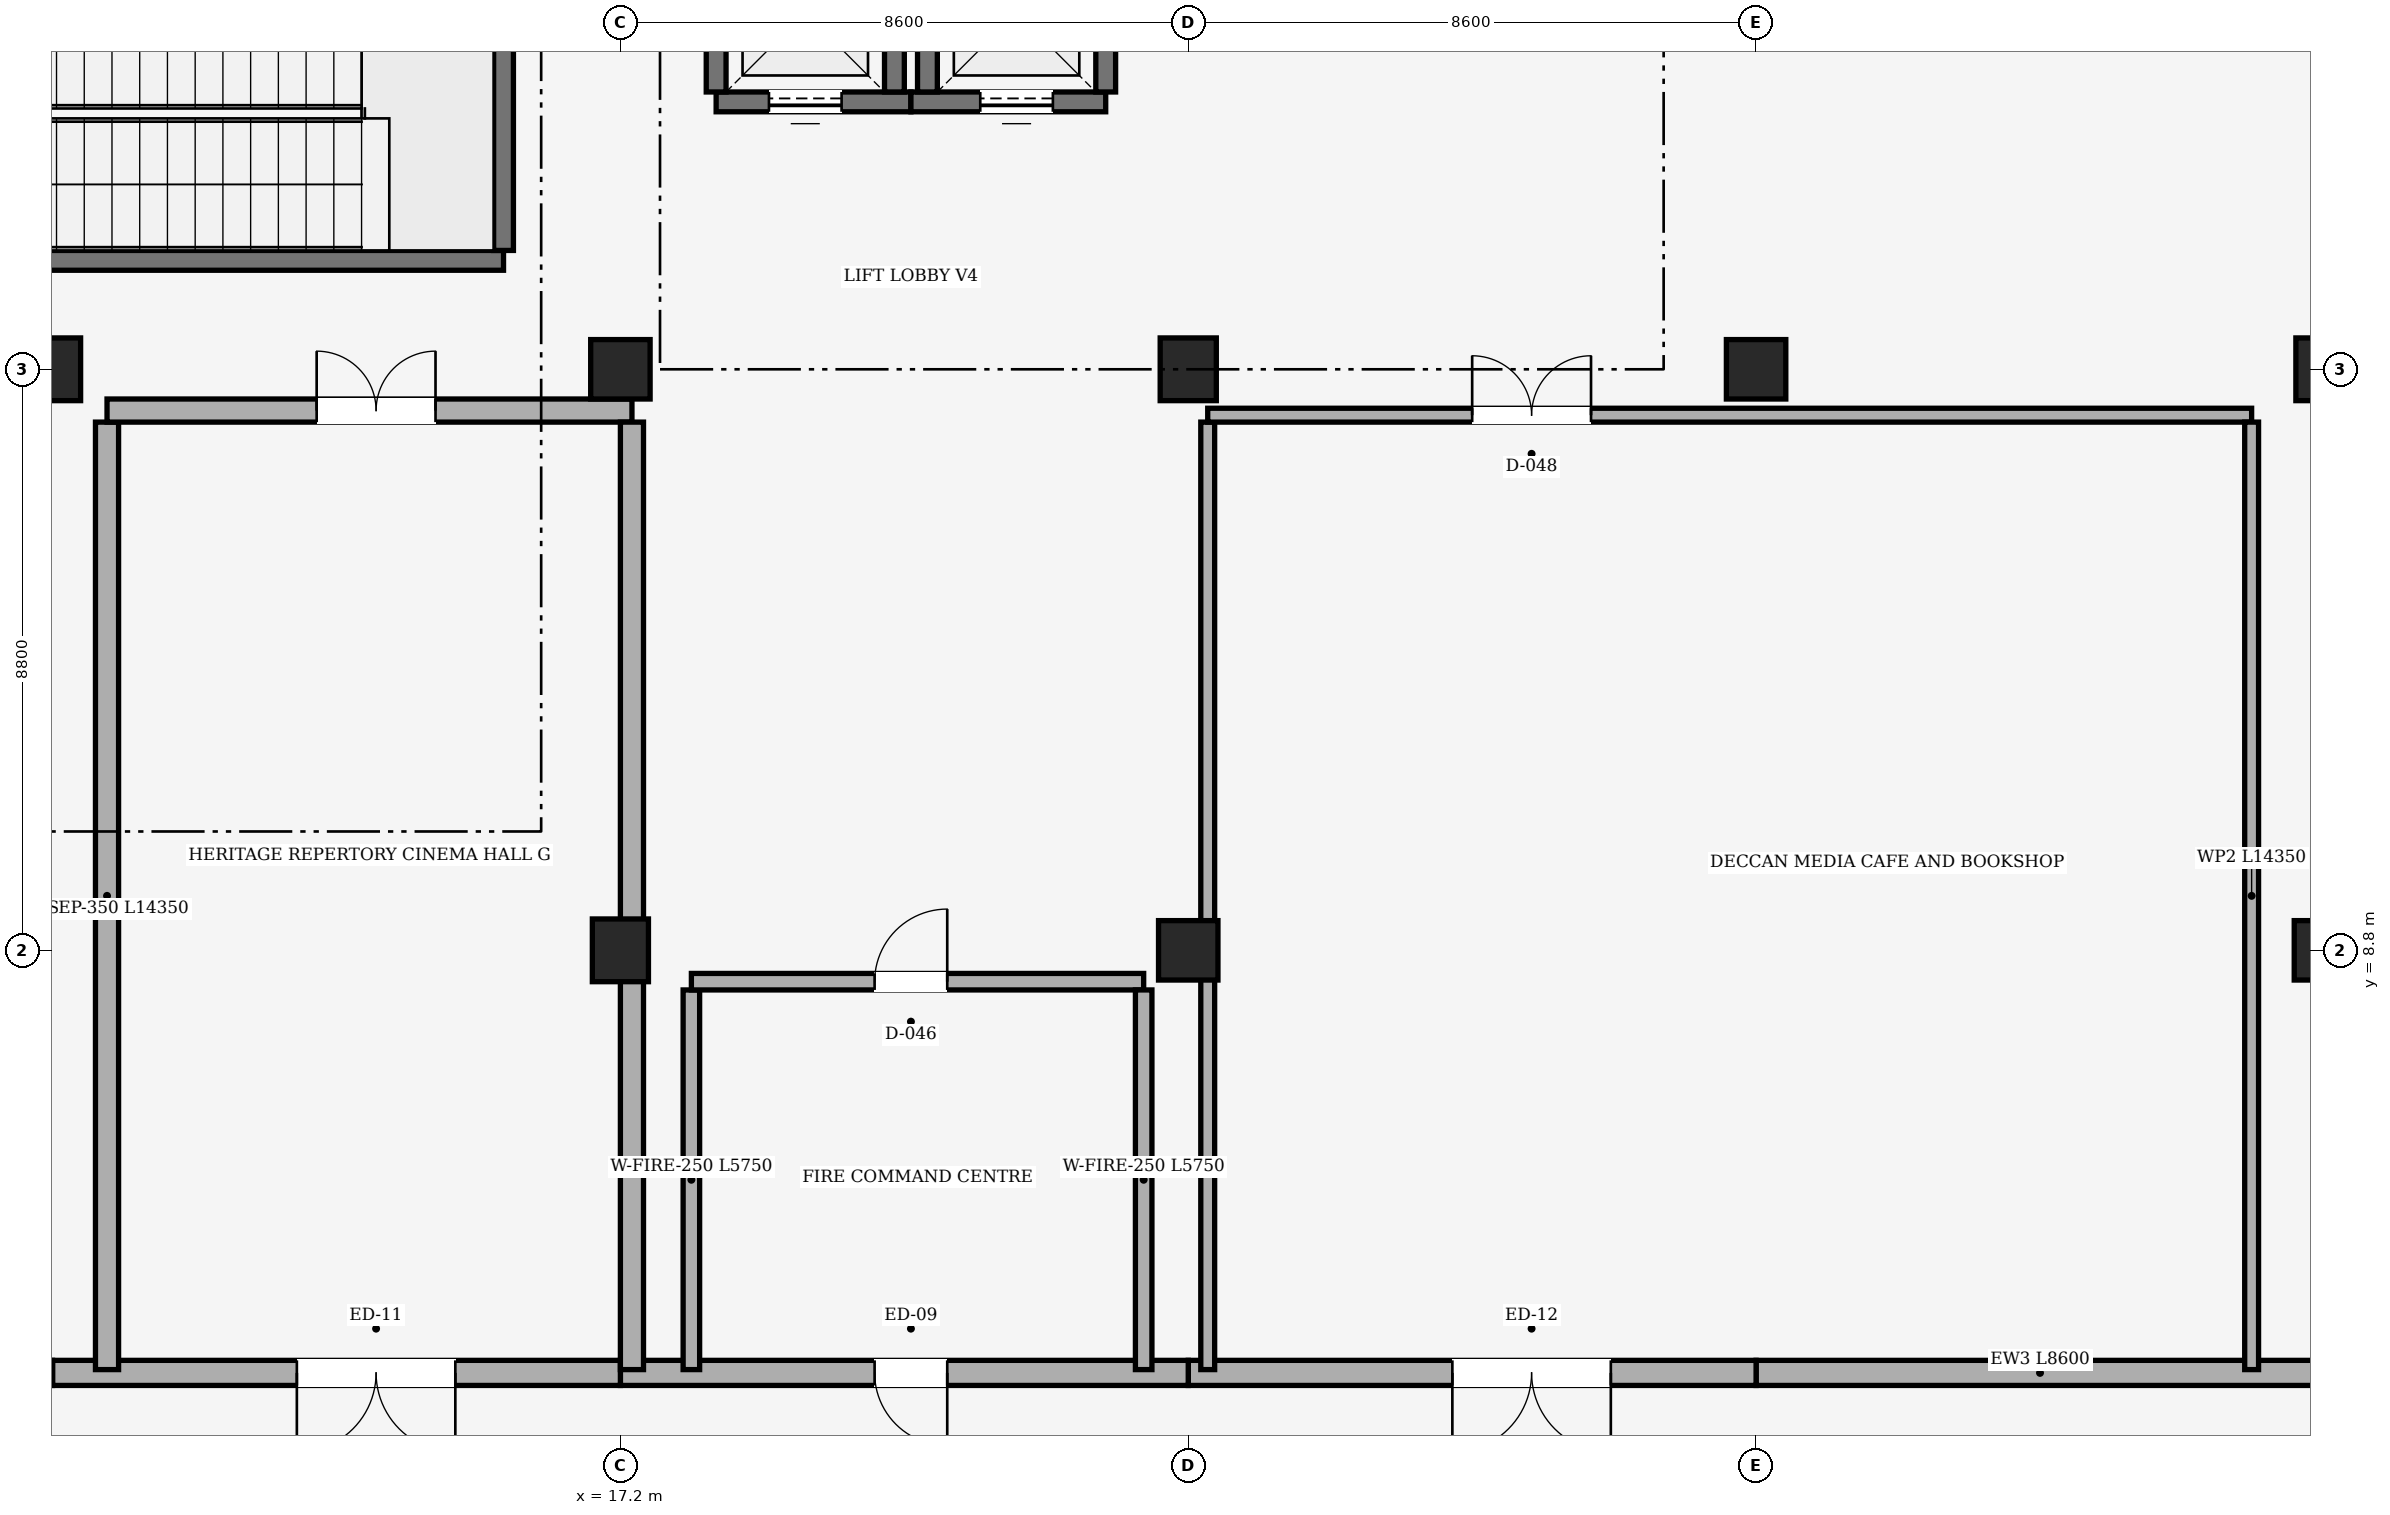
"""IFC4 building model, lengths in metres.
Left out: names, types, materials, properties, quantities, classifications, styles, units other than length and angle.
Written with IfcOpenShell. Run it as: python <this file> out.ifc"""

import sys

from ifc_helpers import new_model, si_unit, direction, frame, frame_2d, origin, origin_2d, place, context, subcontext, project, spatial, rectangle, extrude, element, fill, save


model = new_model("IFC4")
c1 = context("Model", 3, precision=1e-05, world=origin(), true_north=direction((0.0, 1.0)))
c2 = subcontext(c1, "Body", "Model", "MODEL_VIEW")
j1 = project(units=[si_unit("LENGTHUNIT", "METRE"), si_unit("PLANEANGLEUNIT", "RADIAN")], contexts=[c1])
p1 = place(None, origin())
s1 = spatial("IfcSite", under=j1, at=p1, CompositionType="ELEMENT")
p2 = place(p1, origin())
s2 = spatial("IfcBuilding", under=s1, at=p2, CompositionType="ELEMENT")
p3 = place(p2, origin())
s3 = spatial("IfcBuildingStorey", under=s2, at=p3, CompositionType="ELEMENT", Elevation=0.0)
for number, where, z_axis, x_axis in (
    (1, (8.6, 17.6, 0.0), (0.0, 0.0, 1.0), (1.0, 0.0, 0.0)),
    (2, (17.2, 8.8, 0.0), (0.0, 0.0, 1.0), (1.0, 0.0, 0.0)),
):
    element("IfcColumn", number, at=place(p3, frame(where, z_axis=z_axis, x_axis=x_axis)), inside=s3, PredefinedType="COLUMN", context=c2, shape_type="SweptSolid", body=[
        extrude(rectangle(XDim=0.85, YDim=0.95, at=origin_2d()), origin(), (0.0, 0.0, 1.0), 4.25),
    ])
for number, where, z_axis, x_axis in (
    (3, (17.2, 17.6, 0.0), (0.0, 0.0, 1.0), (1.0, 0.0, 0.0)),
    (4, (25.8, 8.8, 0.0), (0.0, 0.0, 1.0), (1.0, 0.0, 0.0)),
):
    element("IfcColumn", number, at=place(p3, frame(where, z_axis=z_axis, x_axis=x_axis)), inside=s3, PredefinedType="COLUMN", context=c2, shape_type="SweptSolid", body=[
        extrude(rectangle(XDim=0.9, YDim=0.9, at=origin_2d()), origin(), (0.0, 0.0, 1.0), 4.25),
    ])
p4 = place(p3, frame((25.8, 17.6, 0.0), z_axis=(0.0, 0.0, 1.0), x_axis=(1.0, 0.0, 0.0)))
e5 = element("IfcColumn", 5, at=p4, inside=s3, PredefinedType="COLUMN", context=c2, shape_type="SweptSolid", body=[
    extrude(rectangle(XDim=0.85, YDim=0.95, at=origin_2d()), origin(), (0.0, 0.0, 1.0), 4.25),
])
for number, where, z_axis, x_axis in (
    (6, (34.4, 17.6, 0.0), (0.0, 0.0, 1.0), (1.0, 0.0, 0.0)),
    (7, (43.0, 8.8, 0.0), (0.0, 0.0, 1.0), (1.0, 0.0, 0.0)),
):
    element("IfcColumn", number, at=place(p3, frame(where, z_axis=z_axis, x_axis=x_axis)), inside=s3, PredefinedType="COLUMN", context=c2, shape_type="SweptSolid", body=[
        extrude(rectangle(XDim=0.9, YDim=0.9, at=origin_2d()), origin(), (0.0, 0.0, 1.0), 4.25),
    ])
p5 = place(p3, frame((43.0, 17.6, 0.0), z_axis=(0.0, 0.0, 1.0), x_axis=(1.0, 0.0, 0.0)))
e8 = element("IfcColumn", 8, at=p5, inside=s3, PredefinedType="COLUMN", context=c2, shape_type="SweptSolid", body=[
    extrude(rectangle(XDim=0.85, YDim=0.95, at=origin_2d()), origin(), (0.0, 0.0, 1.0), 4.25),
])
p6 = place(p3, frame((43.0, 2.4, 0.0), z_axis=(0.0, 0.0, 1.0), x_axis=(-1.0, 0.0, 0.0)))
e9 = element("IfcWall", 9, at=p6, inside=s3, PredefinedType="SOLIDWALL", context=c2, shape_type="SweptSolid", body=[
    extrude(rectangle(XDim=8.6, YDim=0.38, at=frame_2d((4.3, 0.0))), origin(), (0.0, 0.0, 1.0), 4.235),
])
p7 = place(p3, frame((34.4, 2.4, 0.0), z_axis=(0.0, 0.0, 1.0), x_axis=(-1.0, 0.0, 0.0)))
e10 = element("IfcWall", 10, at=p7, inside=s3, PredefinedType="SOLIDWALL", context=c2, shape_type="SweptSolid", body=[
    extrude(rectangle(XDim=8.6, YDim=0.38, at=frame_2d((4.3, 0.0))), origin(), (0.0, 0.0, 1.0), 4.235),
])
p8 = place(p7, frame((2.2, 0.0, 0.0)))
e11 = element("IfcOpeningElement", 11, at=p8, cuts=e10, PredefinedType="OPENING", context=c2, shape_type="SweptSolid", body=[
    extrude(rectangle(XDim=2.4, YDim=2.3, at=frame_2d((1.2, 1.15))), frame((0.0, 0.19, 0.0), z_axis=(0.0, -1.0, 0.0), x_axis=(1.0, 0.0, 0.0)), (0.0, 0.0, 1.0), 0.38),
])
p9 = place(p3, frame((25.8, 2.4, 0.0), z_axis=(0.0, 0.0, 1.0), x_axis=(-1.0, 0.0, 0.0)))
e12 = element("IfcWall", 12, at=p9, inside=s3, PredefinedType="SOLIDWALL", context=c2, shape_type="SweptSolid", body=[
    extrude(rectangle(XDim=8.6, YDim=0.38, at=frame_2d((4.3, 0.0))), origin(), (0.0, 0.0, 1.0), 4.235),
])
p10 = place(p9, frame((3.65, 0.0, 0.0)))
e13 = element("IfcOpeningElement", 13, at=p10, cuts=e12, PredefinedType="OPENING", context=c2, shape_type="SweptSolid", body=[
    extrude(rectangle(XDim=1.1, YDim=2.15, at=frame_2d((0.55, 1.075))), frame((0.0, 0.19, 0.0), z_axis=(0.0, -1.0, 0.0), x_axis=(1.0, 0.0, 0.0)), (0.0, 0.0, 1.0), 0.38),
])
p11 = place(p3, frame((17.2, 2.4, 0.0), z_axis=(0.0, 0.0, 1.0), x_axis=(-1.0, 0.0, 0.0)))
e14 = element("IfcWall", 14, at=p11, inside=s3, PredefinedType="SOLIDWALL", context=c2, shape_type="SweptSolid", body=[
    extrude(rectangle(XDim=8.6, YDim=0.38, at=frame_2d((4.3, 0.0))), origin(), (0.0, 0.0, 1.0), 4.235),
])
p12 = place(p11, frame((2.5, 0.0, 0.0)))
e15 = element("IfcOpeningElement", 15, at=p12, cuts=e14, PredefinedType="OPENING", context=c2, shape_type="SweptSolid", body=[
    extrude(rectangle(XDim=2.4, YDim=2.3, at=frame_2d((1.2, 1.15))), frame((0.0, 0.19, 0.0), z_axis=(0.0, -1.0, 0.0), x_axis=(1.0, 0.0, 0.0)), (0.0, 0.0, 1.0), 0.38),
])
p13 = place(p3, frame((15.43, 19.25, 0.0), z_axis=(0.0, 0.0, 1.0), x_axis=(-1.0, 0.0, 0.0)))
e16 = element("IfcWall", 16, at=p13, inside=s3, PredefinedType="SHEAR", context=c2, shape_type="SweptSolid", body=[
    extrude(rectangle(XDim=10.18, YDim=0.3, at=frame_2d((5.09, 0.0))), origin(), (0.0, 0.0, 1.0), 4.25),
])
p14 = place(p3, frame((15.43, 23.55, 0.0), z_axis=(0.0, 0.0, 1.0), x_axis=(0.0, -1.0, 0.0)))
e17 = element("IfcWall", 17, at=p14, inside=s3, PredefinedType="SHEAR", context=c2, shape_type="SweptSolid", body=[
    extrude(rectangle(XDim=4.15, YDim=0.3, at=frame_2d((2.075, 0.0))), origin(), (0.0, 0.0, 1.0), 4.25),
])
p15 = place(p3, frame((21.6, 21.65, 0.0), z_axis=(0.0, 0.0, 1.0), x_axis=(-1.0, 0.0, 0.0)))
e18 = element("IfcWall", 18, at=p15, inside=s3, PredefinedType="SHEAR", context=c2, shape_type="SweptSolid", body=[
    extrude(rectangle(XDim=2.95, YDim=0.3, at=frame_2d((1.475, 0.0))), origin(), (0.0, 0.0, 1.0), 4.25),
])
p16 = place(p15, frame((1.05, 0.0, 0.0)))
e19 = element("IfcOpeningElement", 19, at=p16, cuts=e18, PredefinedType="OPENING", context=c2, shape_type="SweptSolid", body=[
    extrude(rectangle(XDim=1.1, YDim=2.1, at=frame_2d((0.55, 1.05))), frame((0.0, 0.15, 0.0), z_axis=(0.0, -1.0, 0.0), x_axis=(1.0, 0.0, 0.0)), (0.0, 0.0, 1.0), 0.3),
])
for number, where, z_axis, x_axis in (
    (20, (18.65, 21.8, 0.0), (0.0, 0.0, 1.0), (0.0, 1.0, 0.0)),
    (21, (21.35, 24.2, 0.0), (0.0, 0.0, 1.0), (0.0, -1.0, 0.0)),
):
    element("IfcWall", number, at=place(p3, frame(where, z_axis=z_axis, x_axis=x_axis)), inside=s3, PredefinedType="SHEAR", context=c2, shape_type="SweptSolid", body=[
        extrude(rectangle(XDim=2.4, YDim=0.3, at=frame_2d((1.2, 0.0))), origin(), (0.0, 0.0, 1.0), 4.25),
    ])
p17 = place(p3, frame((24.55, 21.65, 0.0), z_axis=(0.0, 0.0, 1.0), x_axis=(-1.0, 0.0, 0.0)))
e22 = element("IfcWall", 22, at=p17, inside=s3, PredefinedType="SHEAR", context=c2, shape_type="SweptSolid", body=[
    extrude(rectangle(XDim=2.95, YDim=0.3, at=frame_2d((1.475, 0.0))), origin(), (0.0, 0.0, 1.0), 4.25),
])
p18 = place(p17, frame((0.8, 0.0, 0.0)))
e23 = element("IfcOpeningElement", 23, at=p18, cuts=e22, PredefinedType="OPENING", context=c2, shape_type="SweptSolid", body=[
    extrude(rectangle(XDim=1.1, YDim=2.1, at=frame_2d((0.55, 1.05))), frame((0.0, 0.15, 0.0), z_axis=(0.0, -1.0, 0.0), x_axis=(1.0, 0.0, 0.0)), (0.0, 0.0, 1.0), 0.3),
])
for number, where, z_axis, x_axis in (
    (24, (21.85, 21.8, 0.0), (0.0, 0.0, 1.0), (0.0, 1.0, 0.0)),
    (25, (24.55, 24.2, 0.0), (0.0, 0.0, 1.0), (0.0, -1.0, 0.0)),
):
    element("IfcWall", number, at=place(p3, frame(where, z_axis=z_axis, x_axis=x_axis)), inside=s3, PredefinedType="SHEAR", context=c2, shape_type="SweptSolid", body=[
        extrude(rectangle(XDim=2.4, YDim=0.3, at=frame_2d((1.2, 0.0))), origin(), (0.0, 0.0, 1.0), 4.25),
    ])
p19 = place(p3, frame((18.275, 2.45, 0.0), z_axis=(0.0, 0.0, 1.0), x_axis=(0.0, 1.0, 0.0)))
e26 = element("IfcWall", 26, at=p19, inside=s3, PredefinedType="SOLIDWALL", context=c2, shape_type="SweptSolid", body=[
    extrude(rectangle(XDim=5.75, YDim=0.25, at=frame_2d((2.875, 0.0))), origin(), (0.0, 0.0, 1.0), 4.23),
])
p20 = place(p3, frame((18.275, 8.325, 0.0), z_axis=(0.0, 0.0, 1.0), x_axis=(1.0, 0.0, 0.0)))
e27 = element("IfcWall", 27, at=p20, inside=s3, PredefinedType="SOLIDWALL", context=c2, shape_type="SweptSolid", body=[
    extrude(rectangle(XDim=6.85, YDim=0.25, at=frame_2d((3.425, 0.0))), origin(), (0.0, 0.0, 1.0), 3.38),
])
p21 = place(p20, frame((2.775, 0.0, 0.0)))
e28 = element("IfcOpeningElement", 28, at=p21, cuts=e27, PredefinedType="OPENING", context=c2, shape_type="SweptSolid", body=[
    extrude(rectangle(XDim=1.1, YDim=2.1, at=frame_2d((0.55, 1.05))), frame((0.0, 0.125, 0.0), z_axis=(0.0, -1.0, 0.0), x_axis=(1.0, 0.0, 0.0)), (0.0, 0.0, 1.0), 0.25),
])
p22 = place(p3, frame((25.125, 8.2, 0.0), z_axis=(0.0, 0.0, 1.0), x_axis=(0.0, -1.0, 0.0)))
e29 = element("IfcWall", 29, at=p22, inside=s3, PredefinedType="SOLIDWALL", context=c2, shape_type="SweptSolid", body=[
    extrude(rectangle(XDim=5.75, YDim=0.25, at=frame_2d((2.875, 0.0))), origin(), (0.0, 0.0, 1.0), 4.23),
])
p23 = place(p3, frame((9.425, 2.45, 0.0), z_axis=(0.0, 0.0, 1.0), x_axis=(0.0, 1.0, 0.0)))
e30 = element("IfcWall", 30, at=p23, inside=s3, PredefinedType="SOLIDWALL", context=c2, shape_type="SweptSolid", body=[
    extrude(rectangle(XDim=14.35, YDim=0.35, at=frame_2d((7.175, 0.0))), origin(), (0.0, 0.0, 1.0), 4.23),
])
p24 = place(p3, frame((9.425, 16.975, 0.0), z_axis=(0.0, 0.0, 1.0), x_axis=(1.0, 0.0, 0.0)))
e31 = element("IfcWall", 31, at=p24, inside=s3, PredefinedType="SOLIDWALL", context=c2, shape_type="SweptSolid", body=[
    extrude(rectangle(XDim=7.95, YDim=0.35, at=frame_2d((3.975, 0.0))), origin(), (0.0, 0.0, 1.0), 4.23),
])
p25 = place(p24, frame((3.175, 0.0, 0.0)))
e32 = element("IfcOpeningElement", 32, at=p25, cuts=e31, PredefinedType="OPENING", context=c2, shape_type="SweptSolid", body=[
    extrude(rectangle(XDim=1.8, YDim=2.25, at=frame_2d((0.9, 1.125))), frame((0.0, 0.175, 0.0), z_axis=(0.0, -1.0, 0.0), x_axis=(1.0, 0.0, 0.0)), (0.0, 0.0, 1.0), 0.35),
])
p26 = place(p3, frame((17.375, 16.8, 0.0), z_axis=(0.0, 0.0, 1.0), x_axis=(0.0, -1.0, 0.0)))
e33 = element("IfcWall", 33, at=p26, inside=s3, PredefinedType="SOLIDWALL", context=c2, shape_type="SweptSolid", body=[
    extrude(rectangle(XDim=14.35, YDim=0.35, at=frame_2d((7.175, 0.0))), origin(), (0.0, 0.0, 1.0), 3.38),
])
p27 = place(p3, frame((26.095, 2.45, 0.0), z_axis=(0.0, 0.0, 1.0), x_axis=(0.0, 1.0, 0.0)))
e34 = element("IfcWall", 34, at=p27, inside=s3, PredefinedType="PARTITIONING", context=c2, shape_type="SweptSolid", body=[
    extrude(rectangle(XDim=14.35, YDim=0.21, at=frame_2d((7.175, 0.0))), origin(), (0.0, 0.0, 1.0), 3.38),
])
p28 = place(p3, frame((26.095, 16.905, 0.0), z_axis=(0.0, 0.0, 1.0), x_axis=(1.0, 0.0, 0.0)))
e35 = element("IfcWall", 35, at=p28, inside=s3, PredefinedType="PARTITIONING", context=c2, shape_type="SweptSolid", body=[
    extrude(rectangle(XDim=15.81, YDim=0.21, at=frame_2d((7.905, 0.0))), origin(), (0.0, 0.0, 1.0), 4.23),
])
p29 = place(p28, frame((4.005, 0.0, 0.0)))
e36 = element("IfcOpeningElement", 36, at=p29, cuts=e35, PredefinedType="OPENING", context=c2, shape_type="SweptSolid", body=[
    extrude(rectangle(XDim=1.8, YDim=2.25, at=frame_2d((0.9, 1.125))), frame((0.0, 0.105, 0.0), z_axis=(0.0, -1.0, 0.0), x_axis=(1.0, 0.0, 0.0)), (0.0, 0.0, 1.0), 0.21),
])
p30 = place(p3, frame((41.905, 16.8, 0.0), z_axis=(0.0, 0.0, 1.0), x_axis=(0.0, -1.0, 0.0)))
e37 = element("IfcWall", 37, at=p30, inside=s3, PredefinedType="PARTITIONING", context=c2, shape_type="SweptSolid", body=[
    extrude(rectangle(XDim=14.35, YDim=0.21, at=frame_2d((7.175, 0.0))), origin(), (0.0, 0.0, 1.0), 4.23),
])
p31 = place(p8, origin())
e38 = element("IfcDoor", 38, at=p31, inside=s3, OperationType="DOUBLE_DOOR_SINGLE_SWING", PredefinedType="DOOR", context=c2, shape_type="SweptSolid", body=[
    extrude(rectangle(XDim=2.4, YDim=2.3, at=frame_2d((1.2, 1.15))), frame((0.0, 0.025, 0.0), z_axis=(0.0, -1.0, 0.0), x_axis=(1.0, 0.0, 0.0)), (0.0, 0.0, 1.0), 0.05),
])
fill(e11, e38)
p32 = place(p10, origin())
e39 = element("IfcDoor", 39, at=p32, inside=s3, OperationType="NOTDEFINED", PredefinedType="DOOR", context=c2, shape_type="SweptSolid", body=[
    extrude(rectangle(XDim=1.1, YDim=2.15, at=frame_2d((0.55, 1.075))), frame((0.0, 0.025, 0.0), z_axis=(0.0, -1.0, 0.0), x_axis=(1.0, 0.0, 0.0)), (0.0, 0.0, 1.0), 0.05),
])
fill(e13, e39)
p33 = place(p12, origin())
e40 = element("IfcDoor", 40, at=p33, inside=s3, OperationType="DOUBLE_DOOR_SINGLE_SWING", PredefinedType="DOOR", context=c2, shape_type="SweptSolid", body=[
    extrude(rectangle(XDim=2.4, YDim=2.3, at=frame_2d((1.2, 1.15))), frame((0.0, 0.025, 0.0), z_axis=(0.0, -1.0, 0.0), x_axis=(1.0, 0.0, 0.0)), (0.0, 0.0, 1.0), 0.05),
])
fill(e15, e40)
p34 = place(p16, origin())
e41 = element("IfcDoor", 41, at=p34, inside=s3, OperationType="SLIDING_TO_LEFT", PredefinedType="DOOR", context=c2, shape_type="SweptSolid", body=[
    extrude(rectangle(XDim=1.1, YDim=2.1, at=frame_2d((0.55, 1.05))), frame((0.0, 0.025, 0.0), z_axis=(0.0, -1.0, 0.0), x_axis=(1.0, 0.0, 0.0)), (0.0, 0.0, 1.0), 0.05),
])
fill(e19, e41)
p35 = place(p18, origin())
e42 = element("IfcDoor", 42, at=p35, inside=s3, OperationType="SLIDING_TO_LEFT", PredefinedType="DOOR", context=c2, shape_type="SweptSolid", body=[
    extrude(rectangle(XDim=1.1, YDim=2.1, at=frame_2d((0.55, 1.05))), frame((0.0, 0.025, 0.0), z_axis=(0.0, -1.0, 0.0), x_axis=(1.0, 0.0, 0.0)), (0.0, 0.0, 1.0), 0.05),
])
fill(e23, e42)
p36 = place(p21, origin())
e43 = element("IfcDoor", 43, at=p36, inside=s3, OperationType="SINGLE_SWING_RIGHT", PredefinedType="DOOR", context=c2, shape_type="SweptSolid", body=[
    extrude(rectangle(XDim=1.1, YDim=2.1, at=frame_2d((0.55, 1.05))), frame((0.0, 0.025, 0.0), z_axis=(0.0, -1.0, 0.0), x_axis=(1.0, 0.0, 0.0)), (0.0, 0.0, 1.0), 0.05),
])
fill(e28, e43)
p37 = place(p25, origin())
e44 = element("IfcDoor", 44, at=p37, inside=s3, OperationType="DOUBLE_DOOR_SINGLE_SWING", PredefinedType="DOOR", context=c2, shape_type="SweptSolid", body=[
    extrude(rectangle(XDim=1.8, YDim=2.25, at=frame_2d((0.9, 1.125))), frame((0.0, 0.025, 0.0), z_axis=(0.0, -1.0, 0.0), x_axis=(1.0, 0.0, 0.0)), (0.0, 0.0, 1.0), 0.05),
])
fill(e32, e44)
p38 = place(p29, origin())
e45 = element("IfcDoor", 45, at=p38, inside=s3, OperationType="DOUBLE_DOOR_SINGLE_SWING", PredefinedType="DOOR", context=c2, shape_type="SweptSolid", body=[
    extrude(rectangle(XDim=1.8, YDim=2.25, at=frame_2d((0.9, 1.125))), frame((0.0, 0.025, 0.0), z_axis=(0.0, -1.0, 0.0), x_axis=(1.0, 0.0, 0.0)), (0.0, 0.0, 1.0), 0.05),
])
fill(e36, e45)
save(model, sys.argv[1])
